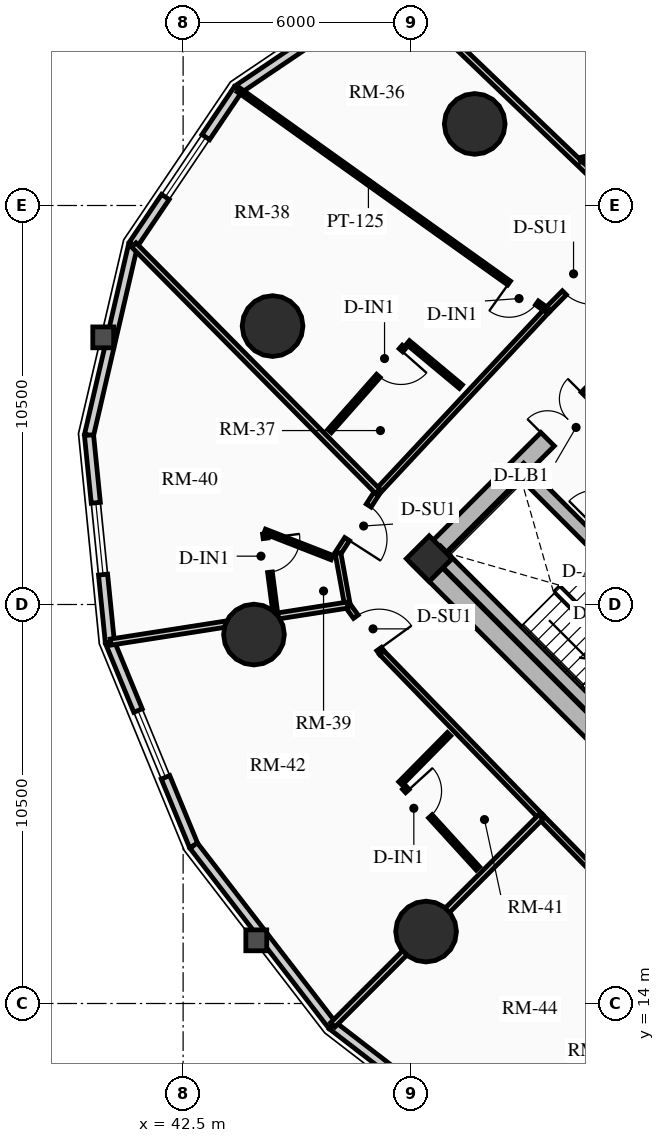
"""IFC4 building model, lengths in metres.
Left out: names, types, materials, properties, quantities, classifications, styles, units other than length and angle.
Written with IfcOpenShell. Run it as: python <this file> out.ifc"""

import sys

from ifc_helpers import new_model, si_unit, direction, frame, frame_2d, origin, origin_2d, place, context, subcontext, project, spatial, rectangle, circle, extrude, source, transform, mapped, element, fill, save


model = new_model("IFC4")
c1 = context("Model", 3, precision=1e-05, world=origin(), true_north=direction((0.0, 1.0)))
c2 = subcontext(c1, "Body", "Model", "MODEL_VIEW")
j1 = project(units=[si_unit("LENGTHUNIT", "METRE"), si_unit("PLANEANGLEUNIT", "RADIAN")], contexts=[c1])
p1 = place(None, origin())
s1 = spatial("IfcSite", under=j1, at=p1, CompositionType="ELEMENT")
p2 = place(p1, origin())
s2 = spatial("IfcBuilding", under=s1, at=p2, CompositionType="ELEMENT")
p3 = place(p2, frame((0.0, 0.0, 51.1)))
s3 = spatial("IfcBuildingStorey", under=s2, at=p3, CompositionType="ELEMENT", Elevation=51.1)
p4 = place(p3, frame((58.773, 15.661, 0.0), z_axis=(0.0, 0.0, 1.0), x_axis=(-0.707106781187, 0.707106781187, 0.0)))
e1 = element("IfcWall", 1, at=p4, inside=s3, PredefinedType="SHEAR", context=c2, shape_type="SweptSolid", body=[
    extrude(rectangle(XDim=14.3, YDim=0.5, at=frame_2d((7.15, 0.0))), origin(), (0.0, 0.0, 1.0), 2.91),
])
p5 = place(p3, frame((48.838, 25.596, 0.0), z_axis=(0.0, 0.0, 1.0), x_axis=(0.707106781187, 0.707106781187, 0.0)))
e2 = element("IfcWall", 2, at=p5, inside=s3, PredefinedType="SHEAR", context=c2, shape_type="SweptSolid", body=[
    extrude(rectangle(XDim=10.7, YDim=0.5, at=frame_2d((5.35, 0.0))), origin(), (0.0, 0.0, 1.0), 2.91),
])
m1 = source(origin(), c2, "Body", "SweptSolid", [
    extrude(rectangle(XDim=1.5, YDim=2.02, at=frame_2d((0.75, 1.01))), frame((0.0, 0.26, 0.0), z_axis=(0.0, -1.0, 0.0), x_axis=(1.0, 0.0, 0.0)), (0.0, 0.0, 1.0), 0.52),
])
p6 = place(p5, frame((4.6, 0.0, 0.0)))
e3 = element("IfcOpeningElement", 3, at=p6, cuts=e2, PredefinedType="OPENING", context=c2, shape_type="MappedRepresentation", body=[
    mapped(m1, transform((0.0, 0.0, 0.0), x_axis=(1.0, 0.0, 0.0), y_axis=(0.0, 1.0, 0.0), z_axis=(0.0, 0.0, 1.0), scale=1.0)),
])
p7 = place(p3, frame((61.096, 18.338, 0.0), z_axis=(0.0, 0.0, 1.0), x_axis=(-0.707106781187, 0.707106781187, 0.0)))
e4 = element("IfcWall", 4, at=p7, inside=s3, PredefinedType="SHEAR", context=c2, shape_type="SweptSolid", body=[
    extrude(rectangle(XDim=13.8, YDim=0.35, at=frame_2d((6.9, 0.0))), origin(), (0.0, 0.0, 1.0), 2.91),
])
m2 = source(origin(), c2, "Body", "SweptSolid", [
    extrude(rectangle(XDim=1.1, YDim=2.015, at=frame_2d((0.55, 1.007))), frame((0.0, 0.185, 0.0), z_axis=(0.0, -1.0, 0.0), x_axis=(1.0, 0.0, 0.0)), (0.0, 0.0, 1.0), 0.37),
])
p8 = place(p7, frame((4.9, 0.0, 0.0)))
e5 = element("IfcOpeningElement", 5, at=p8, cuts=e4, PredefinedType="OPENING", context=c2, shape_type="MappedRepresentation", body=[
    mapped(m2, transform((0.0, 0.0, 0.0), x_axis=(1.0, 0.0, 0.0), y_axis=(0.0, 1.0, 0.0), z_axis=(0.0, 0.0, 1.0), scale=1.0)),
])
m3 = source(origin(), c2, "Body", "SweptSolid", [
    extrude(rectangle(XDim=1.15, YDim=2.02, at=frame_2d((0.575, 1.01))), frame((0.0, 0.185, 0.0), z_axis=(0.0, -1.0, 0.0), x_axis=(1.0, 0.0, 0.0)), (0.0, 0.0, 1.0), 0.37),
])
p9 = place(p7, frame((7.32, 0.0, 0.0)))
e6 = element("IfcOpeningElement", 6, at=p9, cuts=e4, PredefinedType="OPENING", context=c2, shape_type="MappedRepresentation", body=[
    mapped(m3, transform((0.0, 0.0, 0.0), x_axis=(1.0, 0.0, 0.0), y_axis=(0.0, 1.0, 0.0), z_axis=(0.0, 0.0, 1.0), scale=1.0)),
])
p10 = place(p3, frame((53.922, 21.141, 0.0), z_axis=(0.0, 0.0, 1.0), x_axis=(-0.707106781187, 0.707106781187, 0.0)))
e7 = element("IfcWall", 7, at=p10, inside=s3, PredefinedType="SHEAR", context=c2, shape_type="SweptSolid", body=[
    extrude(rectangle(XDim=6.745, YDim=0.35, at=frame_2d((3.373, 0.0))), origin(), (0.0, 0.0, 1.0), 2.91),
])
p11 = place(p3, frame((48.976, 25.706, 0.0), z_axis=(0.0, 0.0, 1.0), x_axis=(0.707106781187, 0.707106781187, 0.0)))
e8 = element("IfcColumn", 8, at=p11, inside=s3, PredefinedType="COLUMN", context=c2, shape_type="SweptSolid", body=[
    extrude(rectangle(XDim=0.85, YDim=0.85, at=origin_2d()), origin(), (0.0, 0.0, 1.0), 2.91),
])
for number, where, z_axis, x_axis in (
    (9, (50.173, 37.146, 0.0), (0.0, 0.0, 1.0), (1.0, 0.0, 0.0)),
    (10, (44.854, 31.827, 0.0), (0.0, 0.0, 1.0), (1.0, 0.0, 0.0)),
    (11, (44.365, 23.709, 0.0), (0.0, 0.0, 1.0), (1.0, 0.0, 0.0)),
    (12, (48.893, 15.893, 0.0), (0.0, 0.0, 1.0), (1.0, 0.0, 0.0)),
):
    element("IfcColumn", number, at=place(p3, frame(where, z_axis=z_axis, x_axis=x_axis)), inside=s3, PredefinedType="USERDEFINED", context=c2, shape_type="SweptSolid", body=[
        extrude(circle(Radius=0.8, at=origin_2d()), origin(), (0.0, 0.0, 1.0), 2.91),
    ])
p12 = place(p3, frame((43.945, 38.055, 0.0), z_axis=(0.0, 0.0, 1.0), x_axis=(0.828736708604, 0.559638693991, 0.0)))
e13 = element("IfcWall", 13, at=p12, inside=s3, PredefinedType="SOLIDWALL", context=c2, shape_type="SweptSolid", body=[
    extrude(rectangle(XDim=4.93, YDim=0.24, at=frame_2d((2.465, 0.0))), origin(), (0.0, 0.0, 1.0), 2.073),
])
p13 = place(p3, frame((41.186, 33.969, 0.0), z_axis=(0.0, 0.0, 1.0), x_axis=(0.559638693991, 0.828736708604, 0.0)))
e14 = element("IfcWall", 14, at=p13, inside=s3, PredefinedType="SOLIDWALL", context=c2, shape_type="SweptSolid", body=[
    extrude(rectangle(XDim=4.93, YDim=0.24, at=frame_2d((2.465, 0.0))), origin(), (0.0, 0.0, 1.0), 2.073),
])
m4 = source(origin(), c2, "Body", "SweptSolid", [
    extrude(rectangle(XDim=1.9, YDim=1.35, at=frame_2d((0.95, 0.675))), frame((0.0, 0.13, 0.0), z_axis=(0.0, -1.0, 0.0), x_axis=(1.0, 0.0, 0.0)), (0.0, 0.0, 1.0), 0.26),
])
p14 = place(p13, frame((1.515, 0.0, 0.65)))
e15 = element("IfcOpeningElement", 15, at=p14, cuts=e14, PredefinedType="OPENING", context=c2, shape_type="MappedRepresentation", body=[
    mapped(m4, transform((0.0, 0.0, 0.0), x_axis=(1.0, 0.0, 0.0), y_axis=(0.0, 1.0, 0.0), z_axis=(0.0, 0.0, 1.0), scale=1.0)),
])
p15 = place(p3, frame((40.024, 28.957, 0.0), z_axis=(0.0, 0.0, 1.0), x_axis=(0.225833060959, 0.974166016949, 0.0)))
e16 = element("IfcWall", 16, at=p15, inside=s3, PredefinedType="SOLIDWALL", context=c2, shape_type="SweptSolid", body=[
    extrude(rectangle(XDim=5.146, YDim=0.24, at=frame_2d((2.573, 0.0))), origin(), (0.0, 0.0, 1.0), 2.073),
])
p16 = place(p3, frame((40.572, 23.507, 0.0), z_axis=(0.0, 0.0, 1.0), x_axis=(-0.100165739718, 0.994970765694, 0.0)))
e17 = element("IfcWall", 17, at=p16, inside=s3, PredefinedType="SOLIDWALL", context=c2, shape_type="SweptSolid", body=[
    extrude(rectangle(XDim=5.477, YDim=0.24, at=frame_2d((2.738, 0.0))), origin(), (0.0, 0.0, 1.0), 2.073),
])
p17 = place(p16, frame((1.788, 0.0, 0.65)))
e18 = element("IfcOpeningElement", 18, at=p17, cuts=e17, PredefinedType="OPENING", context=c2, shape_type="MappedRepresentation", body=[
    mapped(m4, transform((0.0, 0.0, 0.0), x_axis=(1.0, 0.0, 0.0), y_axis=(0.0, 1.0, 0.0), z_axis=(0.0, 0.0, 1.0), scale=1.0)),
])
p18 = place(p3, frame((42.778, 18.156, 0.0), z_axis=(0.0, 0.0, 1.0), x_axis=(-0.381027682565, 0.924563629567, 0.0)))
e19 = element("IfcWall", 19, at=p18, inside=s3, PredefinedType="SOLIDWALL", context=c2, shape_type="SweptSolid", body=[
    extrude(rectangle(XDim=5.789, YDim=0.24, at=frame_2d((2.894, 0.0))), origin(), (0.0, 0.0, 1.0), 2.073),
])
p19 = place(p18, frame((1.944, 0.0, 0.65)))
e20 = element("IfcOpeningElement", 20, at=p19, cuts=e19, PredefinedType="OPENING", context=c2, shape_type="MappedRepresentation", body=[
    mapped(m4, transform((0.0, 0.0, 0.0), x_axis=(1.0, 0.0, 0.0), y_axis=(0.0, 1.0, 0.0), z_axis=(0.0, 0.0, 1.0), scale=1.0)),
])
p20 = place(p3, frame((46.425, 13.425, 0.0), z_axis=(0.0, 0.0, 1.0), x_axis=(-0.610502519057, 0.792014314407, 0.0)))
e21 = element("IfcWall", 21, at=p20, inside=s3, PredefinedType="SOLIDWALL", context=c2, shape_type="SweptSolid", body=[
    extrude(rectangle(XDim=5.973, YDim=0.24, at=frame_2d((2.987, 0.0))), origin(), (0.0, 0.0, 1.0), 2.073),
])
p21 = place(p3, frame((51.156, 9.778, 0.0), z_axis=(0.0, 0.0, 1.0), x_axis=(-0.792014314407, 0.610502519057, 0.0)))
e22 = element("IfcWall", 22, at=p21, inside=s3, PredefinedType="SOLIDWALL", context=c2, shape_type="SweptSolid", body=[
    extrude(rectangle(XDim=5.973, YDim=0.24, at=frame_2d((2.987, 0.0))), origin(), (0.0, 0.0, 1.0), 2.073),
])
p22 = place(p21, frame((2.037, 0.0, 0.65)))
e23 = element("IfcOpeningElement", 23, at=p22, cuts=e22, PredefinedType="OPENING", context=c2, shape_type="MappedRepresentation", body=[
    mapped(m4, transform((0.0, 0.0, 0.0), x_axis=(1.0, 0.0, 0.0), y_axis=(0.0, 1.0, 0.0), z_axis=(0.0, 0.0, 1.0), scale=1.0)),
])
p23 = place(p3, frame((54.461, 34.648, 0.0), z_axis=(0.0, 0.0, 1.0), x_axis=(-0.70403409755, -0.710166170334, 0.0)))
e24 = element("IfcWall", 24, at=p23, inside=s3, PredefinedType="PARTITIONING", context=c2, shape_type="SweptSolid", body=[
    extrude(rectangle(XDim=3.384, YDim=0.15, at=frame_2d((1.692, 0.0))), origin(), (0.0, 0.0, 1.0), 2.159),
])
m5 = source(origin(), c2, "Body", "SweptSolid", [
    extrude(rectangle(XDim=1.05, YDim=2.015, at=frame_2d((0.525, 1.007))), frame((0.0, 0.085, 0.0), z_axis=(0.0, -1.0, 0.0), x_axis=(1.0, 0.0, 0.0)), (0.0, 0.0, 1.0), 0.17),
])
p24 = place(p23, frame((1.691, 0.0, 0.0)))
e25 = element("IfcOpeningElement", 25, at=p24, cuts=e24, PredefinedType="OPENING", context=c2, shape_type="MappedRepresentation", body=[
    mapped(m5, transform((0.0, 0.0, 0.0), x_axis=(1.0, 0.0, 0.0), y_axis=(0.0, 1.0, 0.0), z_axis=(0.0, 0.0, 1.0), scale=1.0)),
])
p25 = place(p3, frame((52.079, 32.244, 0.0), z_axis=(0.0, 0.0, 1.0), x_axis=(-0.682703325574, -0.730695674854, 0.0)))
e26 = element("IfcWall", 26, at=p25, inside=s3, PredefinedType="PARTITIONING", context=c2, shape_type="SweptSolid", body=[
    extrude(rectangle(XDim=6.527, YDim=0.15, at=frame_2d((3.263, 0.0))), origin(), (0.0, 0.0, 1.0), 2.159),
])
p26 = place(p3, frame((47.623, 27.475, 0.0), z_axis=(0.0, 0.0, 1.0), x_axis=(-0.54158041545, -0.840648947898, 0.0)))
e27 = element("IfcWall", 27, at=p26, inside=s3, PredefinedType="PARTITIONING", context=c2, shape_type="SweptSolid", body=[
    extrude(rectangle(XDim=1.934, YDim=0.15, at=frame_2d((0.967, 0.0))), origin(), (0.0, 0.0, 1.0), 2.159),
])
p27 = place(p26, frame((0.442, 0.0, 0.0)))
e28 = element("IfcOpeningElement", 28, at=p27, cuts=e27, PredefinedType="OPENING", context=c2, shape_type="MappedRepresentation", body=[
    mapped(m5, transform((0.0, 0.0, 0.0), x_axis=(1.0, 0.0, 0.0), y_axis=(0.0, 1.0, 0.0), z_axis=(0.0, 0.0, 1.0), scale=1.0)),
])
p28 = place(p3, frame((46.576, 25.85, 0.0), z_axis=(0.0, 0.0, 1.0), x_axis=(0.178962865041, -0.983855829345, 0.0)))
e29 = element("IfcWall", 29, at=p28, inside=s3, PredefinedType="PARTITIONING", context=c2, shape_type="SweptSolid", body=[
    extrude(rectangle(XDim=1.387, YDim=0.15, at=frame_2d((0.694, 0.0))), origin(), (0.0, 0.0, 1.0), 2.159),
])
p29 = place(p3, frame((46.824, 24.485, 0.0), z_axis=(0.0, 0.0, 1.0), x_axis=(0.584890953925, -0.811111935565, 0.0)))
e30 = element("IfcWall", 30, at=p29, inside=s3, PredefinedType="PARTITIONING", context=c2, shape_type="SweptSolid", body=[
    extrude(rectangle(XDim=1.547, YDim=0.15, at=frame_2d((0.773, 0.0))), origin(), (0.0, 0.0, 1.0), 2.205),
])
p30 = place(p29, frame((0.377, 0.0, 0.0)))
e31 = element("IfcOpeningElement", 31, at=p30, cuts=e30, PredefinedType="OPENING", context=c2, shape_type="MappedRepresentation", body=[
    mapped(m5, transform((0.0, 0.0, 0.0), x_axis=(1.0, 0.0, 0.0), y_axis=(0.0, 1.0, 0.0), z_axis=(0.0, 0.0, 1.0), scale=1.0)),
])
p31 = place(p3, frame((47.729, 23.23, 0.0), z_axis=(0.0, 0.0, 1.0), x_axis=(0.696119834292, -0.717925606386, 0.0)))
e32 = element("IfcWall", 32, at=p31, inside=s3, PredefinedType="PARTITIONING", context=c2, shape_type="SweptSolid", body=[
    extrude(rectangle(XDim=6.012, YDim=0.15, at=frame_2d((3.006, 0.0))), origin(), (0.0, 0.0, 1.0), 2.635),
])
p32 = place(p3, frame((51.914, 18.914, 0.0), z_axis=(0.0, 0.0, 1.0), x_axis=(0.6999614951, -0.71418058317, 0.0)))
e33 = element("IfcWall", 33, at=p32, inside=s3, PredefinedType="PARTITIONING", context=c2, shape_type="SweptSolid", body=[
    extrude(rectangle(XDim=6.13, YDim=0.15, at=frame_2d((3.065, 0.0))), origin(), (0.0, 0.0, 1.0), 2.159),
])
p33 = place(p32, frame((2.54, 0.0, 0.0)))
e34 = element("IfcOpeningElement", 34, at=p33, cuts=e33, PredefinedType="OPENING", context=c2, shape_type="MappedRepresentation", body=[
    mapped(m5, transform((0.0, 0.0, 0.0), x_axis=(1.0, 0.0, 0.0), y_axis=(0.0, 1.0, 0.0), z_axis=(0.0, 0.0, 1.0), scale=1.0)),
])
p34 = place(p3, frame((54.461, 34.648, 0.0), z_axis=(0.0, 0.0, 1.0), x_axis=(-0.722290498621, 0.691589788532, 0.0)))
e35 = element("IfcWall", 35, at=p34, inside=s3, PredefinedType="PARTITIONING", context=c2, shape_type="SweptSolid", body=[
    extrude(rectangle(XDim=8.891, YDim=0.16, at=frame_2d((4.445, 0.0))), origin(), (0.0, 0.0, 1.0), 2.073),
])
p35 = place(p3, frame((47.623, 27.475, 0.0), z_axis=(0.0, 0.0, 1.0), x_axis=(-0.703512438021, 0.71068294587, 0.0)))
e36 = element("IfcWall", 36, at=p35, inside=s3, PredefinedType="PARTITIONING", context=c2, shape_type="SweptSolid", body=[
    extrude(rectangle(XDim=9.125, YDim=0.16, at=frame_2d((4.562, 0.0))), origin(), (0.0, 0.0, 1.0), 2.073),
])
p36 = place(p3, frame((46.824, 24.485, 0.0), z_axis=(0.0, 0.0, 1.0), x_axis=(-0.988003730645, -0.154430010784, 0.0)))
e37 = element("IfcWall", 37, at=p36, inside=s3, PredefinedType="PARTITIONING", context=c2, shape_type="SweptSolid", body=[
    extrude(rectangle(XDim=6.308, YDim=0.16, at=frame_2d((3.154, 0.0))), origin(), (0.0, 0.0, 1.0), 2.073),
])
p37 = place(p3, frame((51.914, 18.914, 0.0), z_axis=(0.0, 0.0, 1.0), x_axis=(-0.707106781187, -0.707106781187, 0.0)))
e38 = element("IfcWall", 38, at=p37, inside=s3, PredefinedType="PARTITIONING", context=c2, shape_type="SweptSolid", body=[
    extrude(rectangle(XDim=7.743, YDim=0.16, at=frame_2d((3.872, 0.0))), origin(), (0.0, 0.0, 1.0), 2.073),
])
p38 = place(p3, frame((54.878, 36.644, 0.0), z_axis=(0.0, 0.0, 1.0), x_axis=(-0.974554917581, -0.224148862631, 0.0)))
e39 = element("IfcWall", 39, at=p38, inside=s3, PredefinedType="PARTITIONING", context=c2, shape_type="SweptSolid", body=[
    extrude(rectangle(XDim=1.982, YDim=0.125, at=frame_2d((0.991, 0.0))), origin(), (0.0, 0.0, 1.0), 2.635),
])
m6 = source(origin(), c2, "Body", "SweptSolid", [
    extrude(rectangle(XDim=0.9, YDim=2.005, at=frame_2d((0.45, 1.002))), frame((0.0, 0.073, 0.0), z_axis=(0.0, -1.0, 0.0), x_axis=(1.0, 0.0, 0.0)), (0.0, 0.0, 1.0), 0.145),
])
p39 = place(p38, frame((0.436, 0.0, 0.0)))
e40 = element("IfcOpeningElement", 40, at=p39, cuts=e39, PredefinedType="OPENING", context=c2, shape_type="MappedRepresentation", body=[
    mapped(m6, transform((0.0, 0.0, 0.0), x_axis=(1.0, 0.0, 0.0), y_axis=(0.0, 1.0, 0.0), z_axis=(0.0, 0.0, 1.0), scale=1.0)),
])
p40 = place(p3, frame((52.079, 32.244, 0.0), z_axis=(0.0, 0.0, 1.0), x_axis=(-0.813888867537, 0.581020577346, 0.0)))
e41 = element("IfcWall", 41, at=p40, inside=s3, PredefinedType="PARTITIONING", context=c2, shape_type="SweptSolid", body=[
    extrude(rectangle(XDim=9.977, YDim=0.125, at=frame_2d((4.988, 0.0))), origin(), (0.0, 0.0, 1.0), 2.073),
])
p41 = place(p40, frame((0.33, 0.0, 0.0)))
e42 = element("IfcOpeningElement", 42, at=p41, cuts=e41, PredefinedType="OPENING", context=c2, shape_type="MappedRepresentation", body=[
    mapped(m6, transform((0.0, 0.0, 0.0), x_axis=(1.0, 0.0, 0.0), y_axis=(0.0, 1.0, 0.0), z_axis=(0.0, 0.0, 1.0), scale=1.0)),
])
p42 = place(p3, frame((49.809, 30.234, 0.0), z_axis=(0.0, 0.0, 1.0), x_axis=(-0.76830950514, 0.640078514177, 0.0)))
e43 = element("IfcWall", 43, at=p42, inside=s3, PredefinedType="PARTITIONING", context=c2, shape_type="SweptSolid", body=[
    extrude(rectangle(XDim=1.814, YDim=0.125, at=frame_2d((0.907, 0.0))), origin(), (0.0, 0.0, 1.0), 2.635),
])
p43 = place(p3, frame((48.313, 31.28, 0.0), z_axis=(0.0, 0.0, 1.0), x_axis=(-0.662230126621, -0.749300513409, 0.0)))
e44 = element("IfcWall", 44, at=p43, inside=s3, PredefinedType="PARTITIONING", context=c2, shape_type="SweptSolid", body=[
    extrude(rectangle(XDim=2.958, YDim=0.125, at=frame_2d((1.479, 0.0))), origin(), (0.0, 0.0, 1.0), 2.159),
])
p44 = place(p43, frame((0.12, 0.0, 0.0)))
e45 = element("IfcOpeningElement", 45, at=p44, cuts=e44, PredefinedType="OPENING", context=c2, shape_type="MappedRepresentation", body=[
    mapped(m6, transform((0.0, 0.0, 0.0), x_axis=(1.0, 0.0, 0.0), y_axis=(0.0, 1.0, 0.0), z_axis=(0.0, 0.0, 1.0), scale=1.0)),
])
p45 = place(p3, frame((46.416, 25.735, 0.0), z_axis=(0.0, 0.0, 1.0), x_axis=(-0.931623241188, 0.363425558373, 0.0)))
e46 = element("IfcWall", 46, at=p45, inside=s3, PredefinedType="PARTITIONING", context=c2, shape_type="SweptSolid", body=[
    extrude(rectangle(XDim=1.9, YDim=0.125, at=frame_2d((0.95, 0.0))), origin(), (0.0, 0.0, 1.0), 2.635),
])
p46 = place(p3, frame((44.654, 26.361, 0.0), z_axis=(0.0, 0.0, 1.0), x_axis=(0.129433729192, -0.991588074629, 0.0)))
e47 = element("IfcWall", 47, at=p46, inside=s3, PredefinedType="PARTITIONING", context=c2, shape_type="SweptSolid", body=[
    extrude(rectangle(XDim=2.097, YDim=0.125, at=frame_2d((1.049, 0.0))), origin(), (0.0, 0.0, 1.0), 2.073),
])
p47 = place(p46, frame((0.12, 0.0, 0.0)))
e48 = element("IfcOpeningElement", 48, at=p47, cuts=e47, PredefinedType="OPENING", context=c2, shape_type="MappedRepresentation", body=[
    mapped(m6, transform((0.0, 0.0, 0.0), x_axis=(1.0, 0.0, 0.0), y_axis=(0.0, 1.0, 0.0), z_axis=(0.0, 0.0, 1.0), scale=1.0)),
])
p48 = place(p3, frame((49.498, 21.087, 0.0), z_axis=(0.0, 0.0, 1.0), x_axis=(-0.702129708151, -0.71204906638, 0.0)))
e49 = element("IfcWall", 49, at=p48, inside=s3, PredefinedType="PARTITIONING", context=c2, shape_type="SweptSolid", body=[
    extrude(rectangle(XDim=1.821, YDim=0.125, at=frame_2d((0.911, 0.0))), origin(), (0.0, 0.0, 1.0), 2.635),
])
p49 = place(p3, frame((48.32, 19.68, 0.0), z_axis=(0.0, 0.0, 1.0), x_axis=(0.673403410236, -0.739275217414, 0.0)))
e50 = element("IfcWall", 50, at=p49, inside=s3, PredefinedType="PARTITIONING", context=c2, shape_type="SweptSolid", body=[
    extrude(rectangle(XDim=2.876, YDim=0.125, at=frame_2d((1.438, 0.0))), origin(), (0.0, 0.0, 1.0), 2.635),
])
p50 = place(p49, frame((0.12, 0.0, 0.0)))
e51 = element("IfcOpeningElement", 51, at=p50, cuts=e50, PredefinedType="OPENING", context=c2, shape_type="MappedRepresentation", body=[
    mapped(m6, transform((0.0, 0.0, 0.0), x_axis=(1.0, 0.0, 0.0), y_axis=(0.0, 1.0, 0.0), z_axis=(0.0, 0.0, 1.0), scale=1.0)),
])
m7 = source(origin(), c2, "Body", "SweptSolid", [
    extrude(rectangle(XDim=1.9, YDim=1.35, at=frame_2d((0.95, 0.675))), frame((0.0, 0.03, 0.0), z_axis=(0.0, -1.0, 0.0), x_axis=(1.0, 0.0, 0.0)), (0.0, 0.0, 1.0), 0.06),
])
p51 = place(p14, origin())
e52 = element("IfcWindow", 52, at=p51, inside=s3, PartitioningType="DOUBLE_PANEL_VERTICAL", PredefinedType="WINDOW", context=c2, shape_type="MappedRepresentation", body=[
    mapped(m7, transform((0.0, 0.0, 0.0), x_axis=(1.0, 0.0, 0.0), y_axis=(0.0, 1.0, 0.0), z_axis=(0.0, 0.0, 1.0), scale=1.0)),
])
fill(e15, e52)
p52 = place(p17, origin())
e53 = element("IfcWindow", 53, at=p52, inside=s3, PartitioningType="DOUBLE_PANEL_VERTICAL", PredefinedType="WINDOW", context=c2, shape_type="MappedRepresentation", body=[
    mapped(m7, transform((0.0, 0.0, 0.0), x_axis=(1.0, 0.0, 0.0), y_axis=(0.0, 1.0, 0.0), z_axis=(0.0, 0.0, 1.0), scale=1.0)),
])
fill(e18, e53)
p53 = place(p19, origin())
e54 = element("IfcWindow", 54, at=p53, inside=s3, PartitioningType="DOUBLE_PANEL_VERTICAL", PredefinedType="WINDOW", context=c2, shape_type="MappedRepresentation", body=[
    mapped(m7, transform((0.0, 0.0, 0.0), x_axis=(1.0, 0.0, 0.0), y_axis=(0.0, 1.0, 0.0), z_axis=(0.0, 0.0, 1.0), scale=1.0)),
])
fill(e20, e54)
m8 = source(origin(), c2, "Body", "SweptSolid", [
    extrude(rectangle(XDim=1.5, YDim=2.02, at=frame_2d((0.75, 1.01))), frame((0.0, 0.025, 0.0), z_axis=(0.0, -1.0, 0.0), x_axis=(1.0, 0.0, 0.0)), (0.0, 0.0, 1.0), 0.05),
])
p54 = place(p6, origin())
e55 = element("IfcDoor", 55, at=p54, inside=s3, OperationType="DOUBLE_DOOR_SINGLE_SWING", PredefinedType="DOOR", context=c2, shape_type="MappedRepresentation", body=[
    mapped(m8, transform((0.0, 0.0, 0.0), x_axis=(1.0, 0.0, 0.0), y_axis=(0.0, 1.0, 0.0), z_axis=(0.0, 0.0, 1.0), scale=1.0)),
])
fill(e3, e55)
m9 = source(origin(), c2, "Body", "SweptSolid", [
    extrude(rectangle(XDim=1.05, YDim=2.015, at=frame_2d((0.525, 1.007))), frame((0.0, 0.025, 0.0), z_axis=(0.0, -1.0, 0.0), x_axis=(1.0, 0.0, 0.0)), (0.0, 0.0, 1.0), 0.05),
])
p55 = place(p24, origin())
e56 = element("IfcDoor", 56, at=p55, inside=s3, OperationType="SINGLE_SWING_LEFT", PredefinedType="DOOR", context=c2, shape_type="MappedRepresentation", body=[
    mapped(m9, transform((0.0, 0.0, 0.0), x_axis=(1.0, 0.0, 0.0), y_axis=(0.0, 1.0, 0.0), z_axis=(0.0, 0.0, 1.0), scale=1.0)),
])
fill(e25, e56)
m10 = source(origin(), c2, "Body", "SweptSolid", [
    extrude(rectangle(XDim=0.9, YDim=2.005, at=frame_2d((0.45, 1.002))), frame((0.0, 0.025, 0.0), z_axis=(0.0, -1.0, 0.0), x_axis=(1.0, 0.0, 0.0)), (0.0, 0.0, 1.0), 0.05),
])
p56 = place(p41, origin())
e57 = element("IfcDoor", 57, at=p56, inside=s3, OperationType="SINGLE_SWING_RIGHT", PredefinedType="DOOR", context=c2, shape_type="MappedRepresentation", body=[
    mapped(m10, transform((0.0, 0.0, 0.0), x_axis=(1.0, 0.0, 0.0), y_axis=(0.0, 1.0, 0.0), z_axis=(0.0, 0.0, 1.0), scale=1.0)),
])
fill(e42, e57)
p57 = place(p44, origin())
e58 = element("IfcDoor", 58, at=p57, inside=s3, OperationType="SINGLE_SWING_LEFT", PredefinedType="DOOR", context=c2, shape_type="MappedRepresentation", body=[
    mapped(m10, transform((0.0, 0.0, 0.0), x_axis=(1.0, 0.0, 0.0), y_axis=(0.0, 1.0, 0.0), z_axis=(0.0, 0.0, 1.0), scale=1.0)),
])
fill(e45, e58)
p58 = place(p27, origin())
e59 = element("IfcDoor", 59, at=p58, inside=s3, OperationType="SINGLE_SWING_RIGHT", PredefinedType="DOOR", context=c2, shape_type="MappedRepresentation", body=[
    mapped(m9, transform((0.0, 0.0, 0.0), x_axis=(1.0, 0.0, 0.0), y_axis=(0.0, 1.0, 0.0), z_axis=(0.0, 0.0, 1.0), scale=1.0)),
])
fill(e28, e59)
p59 = place(p47, origin())
e60 = element("IfcDoor", 60, at=p59, inside=s3, OperationType="SINGLE_SWING_LEFT", PredefinedType="DOOR", context=c2, shape_type="MappedRepresentation", body=[
    mapped(m10, transform((0.0, 0.0, 0.0), x_axis=(1.0, 0.0, 0.0), y_axis=(0.0, 1.0, 0.0), z_axis=(0.0, 0.0, 1.0), scale=1.0)),
])
fill(e48, e60)
p60 = place(p30, origin())
e61 = element("IfcDoor", 61, at=p60, inside=s3, OperationType="SINGLE_SWING_RIGHT", PredefinedType="DOOR", context=c2, shape_type="MappedRepresentation", body=[
    mapped(m9, transform((0.0, 0.0, 0.0), x_axis=(1.0, 0.0, 0.0), y_axis=(0.0, 1.0, 0.0), z_axis=(0.0, 0.0, 1.0), scale=1.0)),
])
fill(e31, e61)
p61 = place(p50, origin())
e62 = element("IfcDoor", 62, at=p61, inside=s3, OperationType="SINGLE_SWING_LEFT", PredefinedType="DOOR", context=c2, shape_type="MappedRepresentation", body=[
    mapped(m10, transform((0.0, 0.0, 0.0), x_axis=(1.0, 0.0, 0.0), y_axis=(0.0, 1.0, 0.0), z_axis=(0.0, 0.0, 1.0), scale=1.0)),
])
fill(e51, e62)
save(model, sys.argv[1])
